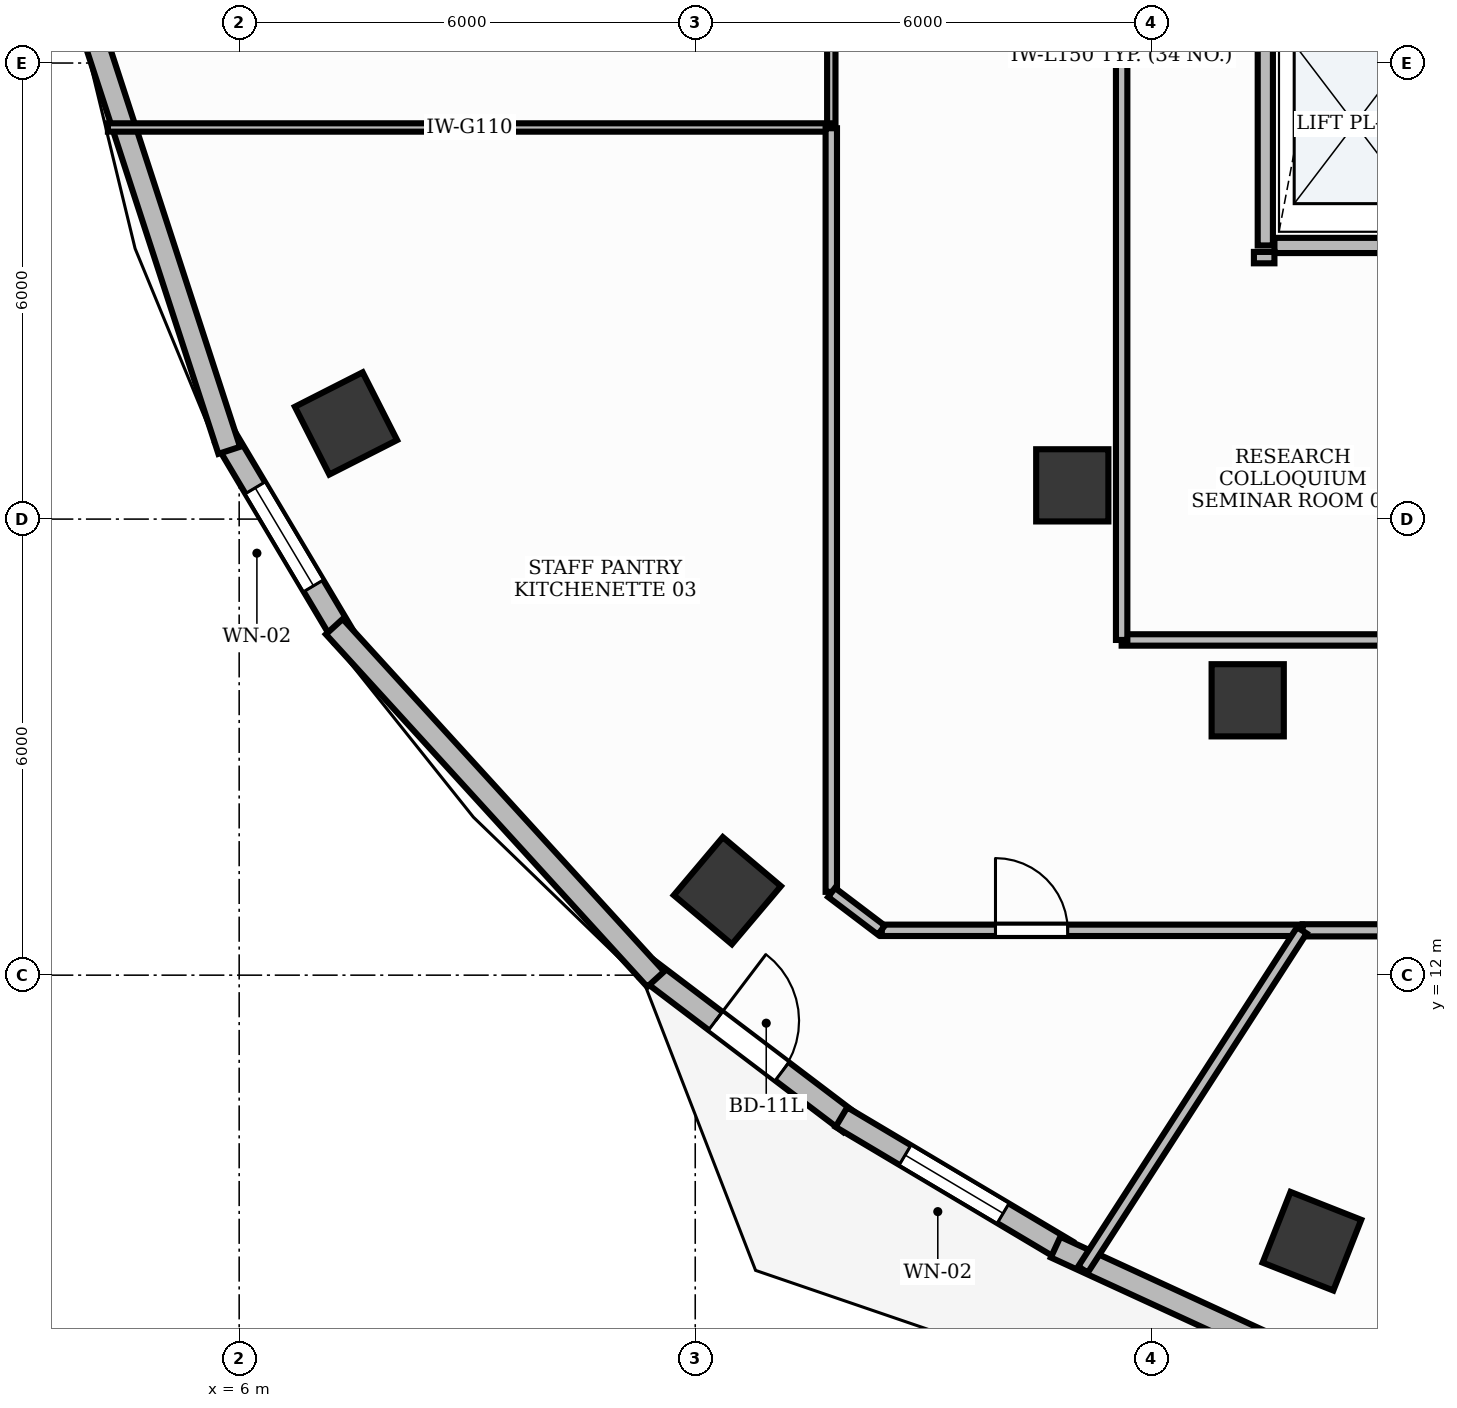
"""IFC4 building model, lengths in metres.
Left out: names, types, materials, properties, quantities, classifications, styles, units other than length and angle.
Written with IfcOpenShell. Run it as: python <this file> out.ifc"""

import sys

from ifc_helpers import new_model, si_unit, direction, frame, frame_2d, origin, origin_2d, place, context, subcontext, project, spatial, rectangle, extrude, element, fill, save


model = new_model("IFC4")
c1 = context("Model", 3, precision=1e-05, world=origin(), true_north=direction((0.0, 1.0)))
c2 = subcontext(c1, "Body", "Model", "MODEL_VIEW")
j1 = project(units=[si_unit("LENGTHUNIT", "METRE"), si_unit("PLANEANGLEUNIT", "RADIAN")], contexts=[c1])
p1 = place(None, origin())
s1 = spatial("IfcSite", under=j1, at=p1, CompositionType="ELEMENT")
p2 = place(p1, origin())
s2 = spatial("IfcBuilding", under=s1, at=p2, CompositionType="ELEMENT")
p3 = place(p2, frame((0.0, 0.0, 222.6)))
s3 = spatial("IfcBuildingStorey", under=s2, at=p3, CompositionType="ELEMENT", Elevation=222.6)
p4 = place(p3, frame((7.405, 19.259, -0.0), z_axis=(0.0, 0.0, 1.0), x_axis=(-0.453057191132, 0.891481453292, 0.0)))
e1 = element("IfcColumn", 1, at=p4, inside=s3, PredefinedType="COLUMN", context=c2, shape_type="SweptSolid", body=[
    extrude(rectangle(XDim=1.0, YDim=1.0, at=origin_2d()), origin(), (0.0, 0.0, 1.0), 3.901),
])
p5 = place(p3, frame((16.96, 18.444, -0.0), z_axis=(0.0, 0.0, 1.0), x_axis=(1.0, 0.0, 0.0)))
e2 = element("IfcColumn", 2, at=p5, inside=s3, PredefinedType="COLUMN", context=c2, shape_type="SweptSolid", body=[
    extrude(rectangle(XDim=0.95, YDim=0.95, at=origin_2d()), origin(), (0.0, 0.0, 1.0), 3.901),
])
p6 = place(p3, frame((12.423, 13.111, -0.0), z_axis=(0.0, 0.0, 1.0), x_axis=(-0.764246456939, 0.644924300253, 0.0)))
e3 = element("IfcColumn", 3, at=p6, inside=s3, PredefinedType="COLUMN", context=c2, shape_type="SweptSolid", body=[
    extrude(rectangle(XDim=1.0, YDim=1.0, at=origin_2d()), origin(), (0.0, 0.0, 1.0), 3.901),
])
p7 = place(p3, frame((19.268, 15.616, -0.0), z_axis=(0.0, 0.0, 1.0), x_axis=(1.0, 0.0, 0.0)))
e4 = element("IfcColumn", 4, at=p7, inside=s3, PredefinedType="COLUMN", context=c2, shape_type="SweptSolid", body=[
    extrude(rectangle(XDim=0.95, YDim=0.95, at=origin_2d()), origin(), (0.0, 0.0, 1.0), 3.901),
])
p8 = place(p3, frame((20.113, 8.5, -0.0), z_axis=(0.0, 0.0, 1.0), x_axis=(-0.930225540858, 0.366988341962, 0.0)))
e5 = element("IfcColumn", 5, at=p8, inside=s3, PredefinedType="COLUMN", context=c2, shape_type="SweptSolid", body=[
    extrude(rectangle(XDim=1.0, YDim=1.0, at=origin_2d()), origin(), (0.0, 0.0, 1.0), 3.901),
])
p9 = place(p3, frame((5.818, 19.071, 0.0), z_axis=(0.0, 0.0, 1.0), x_axis=(0.511263271049, -0.859424148879, 0.0)))
e6 = element("IfcWall", 6, at=p9, inside=s3, PredefinedType="STANDARD", context=c2, shape_type="SweptSolid", body=[
    extrude(rectangle(XDim=3.036, YDim=0.3, at=frame_2d((1.518, 0.0))), origin(), (0.0, 0.0, 1.0), 3.9),
])
p10 = place(p9, frame((0.768, 0.0, 0.95)))
e7 = element("IfcOpeningElement", 7, at=p10, cuts=e6, PredefinedType="OPENING", context=c2, shape_type="SweptSolid", body=[
    extrude(rectangle(XDim=1.5, YDim=1.8, at=frame_2d((0.75, 0.9))), frame((0.0, 0.165, 0.0), z_axis=(0.0, -1.0, 0.0), x_axis=(1.0, 0.0, 0.0)), (0.0, 0.0, 1.0), 0.33),
])
p11 = place(p3, frame((11.371, 12.076, 0.0), z_axis=(0.0, 0.0, 1.0), x_axis=(0.796906901107, -0.604102136205, 0.0)))
e8 = element("IfcWall", 8, at=p11, inside=s3, PredefinedType="STANDARD", context=c2, shape_type="SweptSolid", body=[
    extrude(rectangle(XDim=3.345, YDim=0.3, at=frame_2d((1.673, 0.0))), origin(), (0.0, 0.0, 1.0), 3.9),
])
p12 = place(p11, frame((1.123, 0.0, 0.0)))
e9 = element("IfcOpeningElement", 9, at=p12, cuts=e8, PredefinedType="OPENING", context=c2, shape_type="SweptSolid", body=[
    extrude(rectangle(XDim=1.1, YDim=2.15, at=frame_2d((0.55, 1.075))), frame((0.0, 0.165, 0.0), z_axis=(0.0, -1.0, 0.0), x_axis=(1.0, 0.0, 0.0)), (0.0, 0.0, 1.0), 0.33),
])
p13 = place(p3, frame((13.923, 10.132, 0.0), z_axis=(0.0, 0.0, 1.0), x_axis=(0.859459434124, -0.511203952543, 0.0)))
e10 = element("IfcWall", 10, at=p13, inside=s3, PredefinedType="STANDARD", context=c2, shape_type="SweptSolid", body=[
    extrude(rectangle(XDim=3.45, YDim=0.3, at=frame_2d((1.725, 0.0))), origin(), (0.0, 0.0, 1.0), 3.9),
])
p14 = place(p13, frame((0.975, 0.0, 0.95)))
e11 = element("IfcOpeningElement", 11, at=p14, cuts=e10, PredefinedType="OPENING", context=c2, shape_type="SweptSolid", body=[
    extrude(rectangle(XDim=1.5, YDim=1.8, at=frame_2d((0.75, 0.9))), frame((0.0, 0.165, 0.0), z_axis=(0.0, -1.0, 0.0), x_axis=(1.0, 0.0, 0.0)), (0.0, 0.0, 1.0), 0.33),
])
p15 = place(p3, frame((4.084, 24.379, 0.0), z_axis=(0.0, 0.0, 1.0), x_axis=(0.309937285623, -0.95075700312, 0.0)))
e12 = element("IfcWall", 12, at=p15, inside=s3, PredefinedType="STANDARD", context=c2, shape_type="SweptSolid", body=[
    extrude(rectangle(XDim=5.758, YDim=0.3, at=frame_2d((2.879, 0.0))), origin(), (0.0, 0.0, 1.0), 3.47),
])
p16 = place(p3, frame((7.252, 16.585, 0.0), z_axis=(0.0, 0.0, 1.0), x_axis=(0.673735114185, -0.73897293314, 0.0)))
e13 = element("IfcWall", 13, at=p16, inside=s3, PredefinedType="STANDARD", context=c2, shape_type="SweptSolid", body=[
    extrude(rectangle(XDim=6.276, YDim=0.3, at=frame_2d((3.138, 0.0))), origin(), (0.0, 0.0, 1.0), 3.9),
])
p17 = place(p3, frame((16.741, 8.422, 0.0), z_axis=(0.0, 0.0, 1.0), x_axis=(0.908506474671, -0.417870776055, 0.0)))
e14 = element("IfcWall", 14, at=p17, inside=s3, PredefinedType="STANDARD", context=c2, shape_type="SweptSolid", body=[
    extrude(rectangle(XDim=3.587, YDim=0.3, at=frame_2d((1.793, 0.0))), origin(), (0.0, 0.0, 1.0), 3.9),
])
p18 = place(p3, frame((19.5, 21.6, 0.0), z_axis=(0.0, 0.0, 1.0), x_axis=(0.0, 1.0, 0.0)))
e15 = element("IfcWall", 15, at=p18, inside=s3, PredefinedType="PARTITIONING", context=c2, shape_type="SweptSolid", body=[
    extrude(rectangle(XDim=10.8, YDim=0.2, at=frame_2d((5.4, 0.0))), origin(), (0.0, 0.0, 1.0), 2.91),
])
p19 = place(p3, frame((19.62, 21.6, 0.0), z_axis=(0.0, 0.0, 1.0), x_axis=(1.0, 0.0, 0.0)))
e16 = element("IfcWall", 16, at=p19, inside=s3, PredefinedType="PARTITIONING", context=c2, shape_type="SweptSolid", body=[
    extrude(rectangle(XDim=2.11, YDim=0.2, at=frame_2d((1.055, 0.0))), origin(), (0.0, 0.0, 1.0), 2.91),
])
p20 = place(p3, frame((13.79, 28.39, 0.0), z_axis=(0.0, 0.0, 1.0), x_axis=(0.0, -1.0, 0.0)))
e17 = element("IfcWall", 17, at=p20, inside=s3, PredefinedType="MOVABLE", context=c2, shape_type="SweptSolid", body=[
    extrude(rectangle(XDim=5.238, YDim=0.11, at=frame_2d((2.619, 0.0))), origin(), (0.0, 0.0, 1.0), 2.91),
])
p21 = place(p20, frame((2.35, 0.0, 0.0)))
e18 = element("IfcOpeningElement", 18, at=p21, cuts=e17, PredefinedType="OPENING", context=c2, shape_type="SweptSolid", body=[
    extrude(rectangle(XDim=0.95, YDim=2.15, at=frame_2d((0.475, 1.075))), frame((0.0, 0.07, 0.0), z_axis=(0.0, -1.0, 0.0), x_axis=(1.0, 0.0, 0.0)), (0.0, 0.0, 1.0), 0.14),
])
p22 = place(p3, frame((14.454, 12.59, 0.0), z_axis=(0.0, 0.0, 1.0), x_axis=(1.0, 0.0, 0.0)))
e19 = element("IfcWall", 19, at=p22, inside=s3, PredefinedType="PARTITIONING", context=c2, shape_type="SweptSolid", body=[
    extrude(rectangle(XDim=5.527, YDim=0.15, at=frame_2d((2.763, 0.0))), origin(), (0.0, 0.0, 1.0), 2.91),
])
p23 = place(p22, frame((1.496, 0.0, 0.0)))
e20 = element("IfcOpeningElement", 20, at=p23, cuts=e19, PredefinedType="OPENING", context=c2, shape_type="SweptSolid", body=[
    extrude(rectangle(XDim=0.95, YDim=2.15, at=frame_2d((0.475, 1.075))), frame((0.0, 0.09, 0.0), z_axis=(0.0, -1.0, 0.0), x_axis=(1.0, 0.0, 0.0)), (0.0, 0.0, 1.0), 0.18),
])
p24 = place(p3, frame((19.991, 12.59, 0.0), z_axis=(0.0, 0.0, 1.0), x_axis=(1.0, 0.0, 0.0)))
e21 = element("IfcWall", 21, at=p24, inside=s3, PredefinedType="PARTITIONING", context=c2, shape_type="SweptSolid", body=[
    extrude(rectangle(XDim=9.611, YDim=0.16, at=frame_2d((4.805, 0.0))), origin(), (0.0, 0.0, 1.0), 2.91),
])
p25 = place(p24, frame((1.591, 0.0, 0.0)))
e22 = element("IfcOpeningElement", 22, at=p25, cuts=e21, PredefinedType="OPENING", context=c2, shape_type="SweptSolid", body=[
    extrude(rectangle(XDim=0.95, YDim=2.15, at=frame_2d((0.475, 1.075))), frame((0.0, 0.095, 0.0), z_axis=(0.0, -1.0, 0.0), x_axis=(1.0, 0.0, 0.0)), (0.0, 0.0, 1.0), 0.19),
])
p26 = place(p3, frame((13.79, 23.152, 0.0), z_axis=(0.0, 0.0, 1.0), x_axis=(-1.0, 0.0, 0.0)))
e23 = element("IfcWall", 23, at=p26, inside=s3, PredefinedType="MOVABLE", context=c2, shape_type="SweptSolid", body=[
    extrude(rectangle(XDim=9.517, YDim=0.11, at=frame_2d((4.758, 0.0))), origin(), (0.0, 0.0, 1.0), 2.91),
])
p27 = place(p3, frame((19.35, 21.44, 0.0), z_axis=(0.0, 0.0, 1.0), x_axis=(1.0, 0.0, 0.0)))
e24 = element("IfcWall", 24, at=p27, inside=s3, PredefinedType="PARTITIONING", context=c2, shape_type="SweptSolid", body=[
    extrude(rectangle(XDim=0.27, YDim=0.15, at=frame_2d((0.135, 0.0))), origin(), (0.0, 0.0, 1.0), 2.91),
])
p28 = place(p3, frame((25.6, 16.41, 0.0), z_axis=(0.0, 0.0, 1.0), x_axis=(-1.0, 0.0, 0.0)))
e25 = element("IfcWall", 25, at=p28, inside=s3, PredefinedType="PARTITIONING", context=c2, shape_type="SweptSolid", body=[
    extrude(rectangle(XDim=7.99, YDim=0.15, at=frame_2d((3.995, 0.0))), origin(), (0.0, 0.0, 1.0), 2.91),
])
p29 = place(p3, frame((17.61, 16.41, 0.0), z_axis=(0.0, 0.0, 1.0), x_axis=(0.0, 1.0, 0.0)))
e26 = element("IfcWall", 26, at=p29, inside=s3, PredefinedType="PARTITIONING", context=c2, shape_type="SweptSolid", body=[
    extrude(rectangle(XDim=15.38, YDim=0.15, at=frame_2d((7.69, 0.0))), origin(), (0.0, 0.0, 1.0), 2.91),
])
p30 = place(p3, frame((13.79, 23.142, 0.0), z_axis=(0.0, 0.0, 1.0), x_axis=(0.0, -1.0, 0.0)))
e27 = element("IfcWall", 27, at=p30, inside=s3, PredefinedType="PARTITIONING", context=c2, shape_type="SweptSolid", body=[
    extrude(rectangle(XDim=10.046, YDim=0.15, at=frame_2d((5.023, 0.0))), origin(), (0.0, 0.0, 1.0), 2.91),
])
p31 = place(p3, frame((13.794, 13.088, 0.0), z_axis=(0.0, 0.0, 1.0), x_axis=(0.796957719098, -0.604035093326, 0.0)))
e28 = element("IfcWall", 28, at=p31, inside=s3, PredefinedType="PARTITIONING", context=c2, shape_type="SweptSolid", body=[
    extrude(rectangle(XDim=0.821, YDim=0.15, at=frame_2d((0.411, 0.0))), origin(), (0.0, 0.0, 1.0), 2.91),
])
p32 = place(p3, frame((19.981, 12.59, 0.0), z_axis=(0.0, 0.0, 1.0), x_axis=(-0.542120587928, -0.840300701026, 0.0)))
e29 = element("IfcWall", 29, at=p32, inside=s3, PredefinedType="PARTITIONING", context=c2, shape_type="SweptSolid", body=[
    extrude(rectangle(XDim=5.311, YDim=0.15, at=frame_2d((2.656, 0.0))), origin(), (0.0, 0.0, 1.0), 2.91),
])
p33 = place(p10, origin())
e30 = element("IfcWindow", 30, at=p33, inside=s3, PartitioningType="DOUBLE_PANEL_VERTICAL", PredefinedType="WINDOW", context=c2, shape_type="SweptSolid", body=[
    extrude(rectangle(XDim=1.5, YDim=1.8, at=frame_2d((0.75, 0.9))), frame((0.0, 0.03, 0.0), z_axis=(0.0, -1.0, 0.0), x_axis=(1.0, 0.0, 0.0)), (0.0, 0.0, 1.0), 0.06),
])
fill(e7, e30)
p34 = place(p12, origin())
e31 = element("IfcDoor", 31, at=p34, inside=s3, OperationType="SINGLE_SWING_LEFT", PredefinedType="DOOR", context=c2, shape_type="SweptSolid", body=[
    extrude(rectangle(XDim=1.1, YDim=2.15, at=frame_2d((0.55, 1.075))), frame((0.0, 0.025, 0.0), z_axis=(0.0, -1.0, 0.0), x_axis=(1.0, 0.0, 0.0)), (0.0, 0.0, 1.0), 0.05),
])
fill(e9, e31)
p35 = place(p14, origin())
e32 = element("IfcWindow", 32, at=p35, inside=s3, PartitioningType="DOUBLE_PANEL_VERTICAL", PredefinedType="WINDOW", context=c2, shape_type="SweptSolid", body=[
    extrude(rectangle(XDim=1.5, YDim=1.8, at=frame_2d((0.75, 0.9))), frame((0.0, 0.03, 0.0), z_axis=(0.0, -1.0, 0.0), x_axis=(1.0, 0.0, 0.0)), (0.0, 0.0, 1.0), 0.06),
])
fill(e11, e32)
p36 = place(p23, origin())
e33 = element("IfcDoor", 33, at=p36, inside=s3, OperationType="SINGLE_SWING_LEFT", PredefinedType="DOOR", context=c2, shape_type="SweptSolid", body=[
    extrude(rectangle(XDim=0.95, YDim=2.15, at=frame_2d((0.475, 1.075))), frame((0.0, 0.025, 0.0), z_axis=(0.0, -1.0, 0.0), x_axis=(1.0, 0.0, 0.0)), (0.0, 0.0, 1.0), 0.05),
])
fill(e20, e33)
save(model, sys.argv[1])
